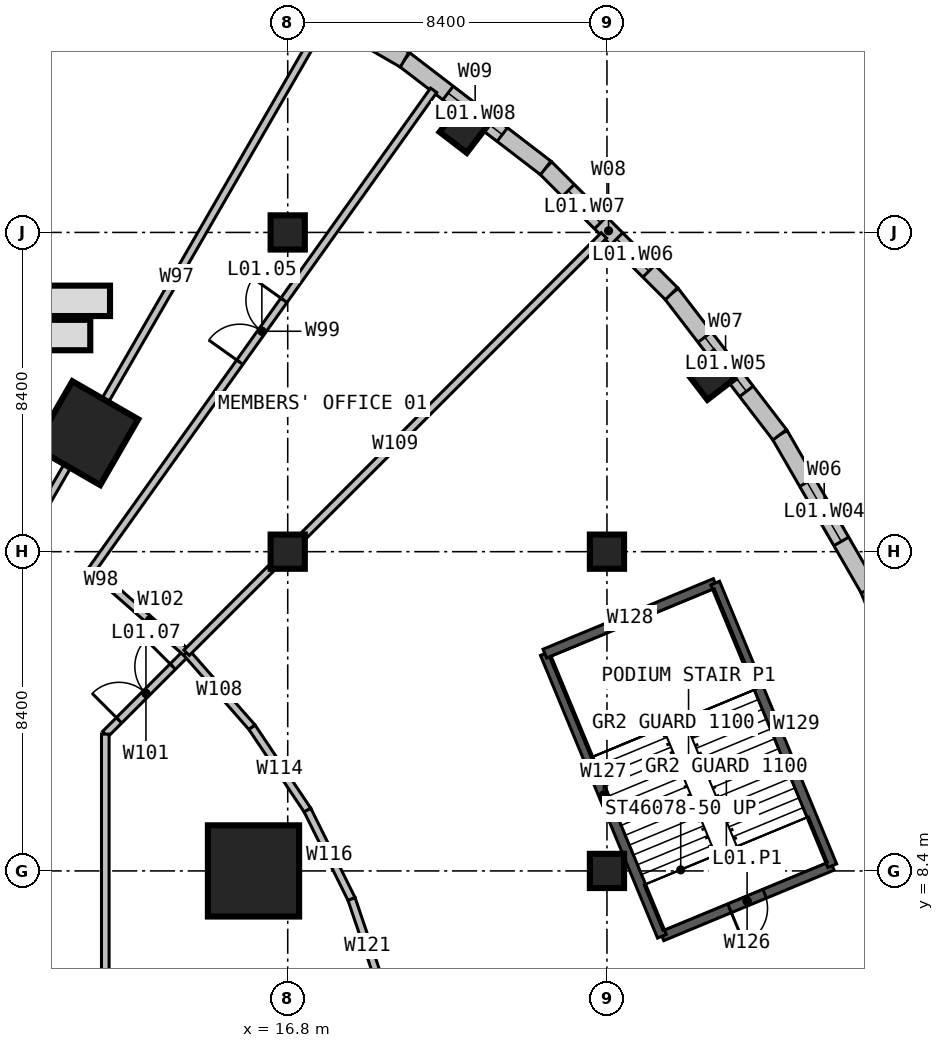
"""IFC4 building model, lengths in metres.
Left out: names, types, materials, properties, quantities, classifications, styles, units other than length and angle.
Written with IfcOpenShell. Run it as: python <this file> out.ifc"""

import sys

from ifc_helpers import new_model, si_unit, direction, frame, frame_2d, origin, origin_2d, place, context, subcontext, project, spatial, rectangle, hollow_rectangle, extrude, element, fill, save


model = new_model("IFC4")
c1 = context("Model", 3, precision=1e-05, world=origin(), true_north=direction((0.0, 1.0)))
c2 = subcontext(c1, "Body", "Model", "MODEL_VIEW")
j1 = project(units=[si_unit("LENGTHUNIT", "METRE"), si_unit("PLANEANGLEUNIT", "RADIAN")], contexts=[c1])
p1 = place(None, origin())
s1 = spatial("IfcSite", under=j1, at=p1, CompositionType="ELEMENT")
p2 = place(p1, origin())
s2 = spatial("IfcBuilding", under=s1, at=p2, CompositionType="ELEMENT")
p3 = place(p2, frame((0.0, 0.0, 6.0)))
s3 = spatial("IfcBuildingStorey", under=s2, at=p3, CompositionType="ELEMENT", Elevation=6.0)
p4 = place(p3, frame((15.9, 8.4, 0.0), z_axis=(0.0, 0.0, 1.0), x_axis=(1.0, 0.0, 0.0)))
e1 = element("IfcColumn", 1, at=p4, inside=s3, PredefinedType="COLUMN", context=c2, shape_type="SweptSolid", body=[
    extrude(rectangle(XDim=2.4, YDim=2.4, at=origin_2d()), origin(), (0.0, 0.0, 1.0), 5.0),
])
for number, where, z_axis, x_axis in (
    (2, (16.8, 16.8, 0.0), (0.0, 0.0, 1.0), (1.0, 0.0, 0.0)),
    (3, (16.8, 25.2, 0.0), (0.0, 0.0, 1.0), (1.0, 0.0, 0.0)),
    (4, (25.2, 8.4, 0.0), (0.0, 0.0, 1.0), (1.0, 0.0, 0.0)),
    (5, (25.2, 16.8, 0.0), (0.0, 0.0, 1.0), (1.0, 0.0, 0.0)),
    (6, (32.521, 13.47, 0.0), (0.0, 0.0, 1.0), (0.924, 0.383, 0.0)),
    (7, (27.926, 21.428, 0.0), (0.0, 0.0, 1.0), (0.793, 0.609, 0.0)),
    (8, (21.428, 27.926, 0.0), (0.0, 0.0, 1.0), (0.609, 0.793, 0.0)),
):
    element("IfcColumn", number, at=place(p3, frame(where, z_axis=z_axis, x_axis=x_axis)), inside=s3, PredefinedType="COLUMN", context=c2, shape_type="SweptSolid", body=[
        extrude(rectangle(XDim=0.9, YDim=0.9, at=origin_2d()), origin(), (0.0, 0.0, 1.0), 5.0),
    ])
p5 = place(p3, frame((11.5, 19.919, 0.0), z_axis=(0.0, 0.0, 1.0), x_axis=(0.5, 0.866025403784, 0.0)))
e9 = element("IfcColumn", 9, at=p5, inside=s3, PredefinedType="COLUMN", context=c2, shape_type="SweptSolid", body=[
    extrude(hollow_rectangle(XDim=2.0, YDim=2.0, WallThickness=0.24, at=origin_2d()), origin(), (0.0, 0.0, 1.0), 5.0),
])
p6 = place(p3, frame((33.876, 11.5, 0.0), z_axis=(0.0, 0.0, 1.0), x_axis=(-0.382669718086, 0.923885213032, 0.0)))
e10 = element("IfcWall", 10, at=p6, inside=s3, PredefinedType="SOLIDWALL", context=c2, shape_type="SweptSolid", body=[
    extrude(rectangle(XDim=4.68, YDim=0.45, at=frame_2d((2.34, 0.0))), origin(), (0.0, 0.0, 1.0), 4.7),
])
p7 = place(p6, frame((1.44, 0.0, 0.9)))
e11 = element("IfcOpeningElement", 11, at=p7, cuts=e10, PredefinedType="OPENING", context=c2, shape_type="SweptSolid", body=[
    extrude(rectangle(XDim=1.8, YDim=2.4, at=frame_2d((0.9, 1.2))), frame((0.0, 0.235, 0.0), z_axis=(0.0, -1.0, 0.0), x_axis=(1.0, 0.0, 0.0)), (0.0, 0.0, 1.0), 0.47),
])
p8 = place(p3, frame((32.086, 15.823, 0.0), z_axis=(0.0, 0.0, 1.0), x_axis=(-0.500022025083, 0.866012687223, 0.0)))
e12 = element("IfcWall", 12, at=p8, inside=s3, PredefinedType="SOLIDWALL", context=c2, shape_type="SweptSolid", body=[
    extrude(rectangle(XDim=4.679, YDim=0.45, at=frame_2d((2.34, 0.0))), origin(), (0.0, 0.0, 1.0), 4.7),
])
p9 = place(p8, frame((1.44, 0.0, 0.9)))
e13 = element("IfcOpeningElement", 13, at=p9, cuts=e12, PredefinedType="OPENING", context=c2, shape_type="SweptSolid", body=[
    extrude(rectangle(XDim=1.8, YDim=2.4, at=frame_2d((0.9, 1.2))), frame((0.0, 0.235, 0.0), z_axis=(0.0, -1.0, 0.0), x_axis=(1.0, 0.0, 0.0)), (0.0, 0.0, 1.0), 0.47),
])
p10 = place(p3, frame((29.746, 19.875, 0.0), z_axis=(0.0, 0.0, 1.0), x_axis=(-0.608769916927, 0.79334682721, 0.0)))
e14 = element("IfcWall", 14, at=p10, inside=s3, PredefinedType="SOLIDWALL", context=c2, shape_type="SweptSolid", body=[
    extrude(rectangle(XDim=4.68, YDim=0.45, at=frame_2d((2.34, 0.0))), origin(), (0.0, 0.0, 1.0), 4.7),
])
p11 = place(p10, frame((1.44, 0.0, 0.9)))
e15 = element("IfcOpeningElement", 15, at=p11, cuts=e14, PredefinedType="OPENING", context=c2, shape_type="SweptSolid", body=[
    extrude(rectangle(XDim=1.8, YDim=2.4, at=frame_2d((0.9, 1.2))), frame((0.0, 0.235, 0.0), z_axis=(0.0, -1.0, 0.0), x_axis=(1.0, 0.0, 0.0)), (0.0, 0.0, 1.0), 0.47),
])
p12 = place(p3, frame((26.897, 23.588, 0.0), z_axis=(0.0, 0.0, 1.0), x_axis=(-0.707106781187, 0.707106781187, 0.0)))
e16 = element("IfcWall", 16, at=p12, inside=s3, PredefinedType="SOLIDWALL", context=c2, shape_type="SweptSolid", body=[
    extrude(rectangle(XDim=4.679, YDim=0.45, at=frame_2d((2.34, 0.0))), origin(), (0.0, 0.0, 1.0), 4.7),
])
p13 = place(p12, frame((0.84, 0.0, 0.9)))
e17 = element("IfcOpeningElement", 17, at=p13, cuts=e16, PredefinedType="OPENING", context=c2, shape_type="SweptSolid", body=[
    extrude(rectangle(XDim=1.2, YDim=2.4, at=frame_2d((0.6, 1.2))), frame((0.0, 0.235, 0.0), z_axis=(0.0, -1.0, 0.0), x_axis=(1.0, 0.0, 0.0)), (0.0, 0.0, 1.0), 0.47),
])
p14 = place(p12, frame((2.64, 0.0, 0.9)))
e18 = element("IfcOpeningElement", 18, at=p14, cuts=e16, PredefinedType="OPENING", context=c2, shape_type="SweptSolid", body=[
    extrude(rectangle(XDim=1.2, YDim=2.4, at=frame_2d((0.6, 1.2))), frame((0.0, 0.235, 0.0), z_axis=(0.0, -1.0, 0.0), x_axis=(1.0, 0.0, 0.0)), (0.0, 0.0, 1.0), 0.47),
])
p15 = place(p3, frame((23.588, 26.897, 0.0), z_axis=(0.0, 0.0, 1.0), x_axis=(-0.79334682721, 0.608769916927, 0.0)))
e19 = element("IfcWall", 19, at=p15, inside=s3, PredefinedType="SOLIDWALL", context=c2, shape_type="SweptSolid", body=[
    extrude(rectangle(XDim=4.68, YDim=0.45, at=frame_2d((2.34, 0.0))), origin(), (0.0, 0.0, 1.0), 4.7),
])
p16 = place(p15, frame((1.44, 0.0, 0.9)))
e20 = element("IfcOpeningElement", 20, at=p16, cuts=e19, PredefinedType="OPENING", context=c2, shape_type="SweptSolid", body=[
    extrude(rectangle(XDim=1.8, YDim=2.4, at=frame_2d((0.9, 1.2))), frame((0.0, 0.235, 0.0), z_axis=(0.0, -1.0, 0.0), x_axis=(1.0, 0.0, 0.0)), (0.0, 0.0, 1.0), 0.47),
])
p17 = place(p3, frame((19.875, 29.746, 0.0), z_axis=(0.0, 0.0, 1.0), x_axis=(-0.866012687223, 0.500022025083, 0.0)))
e21 = element("IfcWall", 21, at=p17, inside=s3, PredefinedType="SOLIDWALL", context=c2, shape_type="SweptSolid", body=[
    extrude(rectangle(XDim=4.679, YDim=0.45, at=frame_2d((2.34, 0.0))), origin(), (0.0, 0.0, 1.0), 4.7),
])
p18 = place(p17, frame((0.84, 0.0, 0.9)))
e22 = element("IfcOpeningElement", 22, at=p18, cuts=e21, PredefinedType="OPENING", context=c2, shape_type="SweptSolid", body=[
    extrude(rectangle(XDim=1.2, YDim=2.4, at=frame_2d((0.6, 1.2))), frame((0.0, 0.235, 0.0), z_axis=(0.0, -1.0, 0.0), x_axis=(1.0, 0.0, 0.0)), (0.0, 0.0, 1.0), 0.47),
])
p19 = place(p17, frame((2.64, 0.0, 0.9)))
e23 = element("IfcOpeningElement", 23, at=p19, cuts=e21, PredefinedType="OPENING", context=c2, shape_type="SweptSolid", body=[
    extrude(rectangle(XDim=1.2, YDim=2.4, at=frame_2d((0.6, 1.2))), frame((0.0, 0.235, 0.0), z_axis=(0.0, -1.0, 0.0), x_axis=(1.0, 0.0, 0.0)), (0.0, 0.0, 1.0), 0.47),
])
p20 = place(p3, frame((31.127, 8.537, 0.0), z_axis=(0.0, 0.0, 1.0), x_axis=(-0.923880627248, -0.382680789426, 0.0)))
e24 = element("IfcWall", 24, at=p20, inside=s3, PredefinedType="SOLIDWALL", context=c2, shape_type="SweptSolid", body=[
    extrude(rectangle(XDim=4.85, YDim=0.25, at=frame_2d((2.425, 0.0))), origin(), (0.0, 0.0, 1.0), 5.0),
])
p21 = place(p20, frame((1.925, 0.0, 0.0)))
e25 = element("IfcOpeningElement", 25, at=p21, cuts=e24, PredefinedType="OPENING", context=c2, shape_type="SweptSolid", body=[
    extrude(rectangle(XDim=1.0, YDim=2.2, at=frame_2d((0.5, 1.1))), frame((0.0, 0.135, 0.0), z_axis=(0.0, -1.0, 0.0), x_axis=(1.0, 0.0, 0.0)), (0.0, 0.0, 1.0), 0.27),
])
p22 = place(p3, frame((26.647, 6.681, 0.0), z_axis=(0.0, 0.0, 1.0), x_axis=(-0.382689294869, 0.923877104161, 0.0)))
e26 = element("IfcWall", 26, at=p22, inside=s3, PredefinedType="SOLIDWALL", context=c2, shape_type="SweptSolid", body=[
    extrude(rectangle(XDim=8.05, YDim=0.25, at=frame_2d((4.025, 0.0))), origin(), (0.0, 0.0, 1.0), 5.0),
])
p23 = place(p3, frame((23.566, 14.118, 0.0), z_axis=(0.0, 0.0, 1.0), x_axis=(0.923862828997, 0.382723755727, 0.0)))
e27 = element("IfcWall", 27, at=p23, inside=s3, PredefinedType="SOLIDWALL", context=c2, shape_type="SweptSolid", body=[
    extrude(rectangle(XDim=4.85, YDim=0.25, at=frame_2d((2.425, 0.0))), origin(), (0.0, 0.0, 1.0), 5.0),
])
p24 = place(p3, frame((28.047, 15.974, 0.0), z_axis=(0.0, 0.0, 1.0), x_axis=(0.382678572144, -0.923881545666, 0.0)))
e28 = element("IfcWall", 28, at=p24, inside=s3, PredefinedType="SOLIDWALL", context=c2, shape_type="SweptSolid", body=[
    extrude(rectangle(XDim=8.05, YDim=0.25, at=frame_2d((4.025, 0.0))), origin(), (0.0, 0.0, 1.0), 5.0),
])
p25 = place(p3, frame((10.0, 17.32, 0.0), z_axis=(0.0, 0.0, 1.0), x_axis=(0.500022035744, 0.866012681068, 0.0)))
e29 = element("IfcWall", 29, at=p25, inside=s3, PredefinedType="PARTITIONING", context=c2, shape_type="SweptSolid", body=[
    extrude(rectangle(XDim=15.519, YDim=0.2, at=frame_2d((7.76, 0.0))), origin(), (0.0, 0.0, 1.0), 4.7),
])
p26 = place(p3, frame((11.6, 16.26, 0.0), z_axis=(0.0, 0.0, 1.0), x_axis=(0.823201613759, -0.567749155089, 0.0)))
e30 = element("IfcWall", 30, at=p26, inside=s3, PredefinedType="PARTITIONING", context=c2, shape_type="SweptSolid", body=[
    extrude(rectangle(XDim=0.704, YDim=0.2, at=frame_2d((0.352, 0.0))), origin(), (0.0, 0.0, 1.0), 4.7),
])
p27 = place(p3, frame((11.6, 16.26, 0.0), z_axis=(0.0, 0.0, 1.0), x_axis=(0.580502370217, 0.814258557322, 0.0)))
e31 = element("IfcWall", 31, at=p27, inside=s3, PredefinedType="PARTITIONING", context=c2, shape_type="SweptSolid", body=[
    extrude(rectangle(XDim=15.572, YDim=0.2, at=frame_2d((7.786, 0.0))), origin(), (0.0, 0.0, 1.0), 4.7),
])
p28 = place(p27, frame((6.786, 0.0, 0.0)))
e32 = element("IfcOpeningElement", 32, at=p28, cuts=e31, PredefinedType="OPENING", context=c2, shape_type="SweptSolid", body=[
    extrude(rectangle(XDim=2.0, YDim=2.4, at=frame_2d((1.0, 1.2))), frame((0.0, 0.11, 0.0), z_axis=(0.0, -1.0, 0.0), x_axis=(1.0, 0.0, 0.0)), (0.0, 0.0, 1.0), 0.22),
])
p29 = place(p3, frame((12.0, 12.0, 0.0), z_axis=(0.0, 0.0, 1.0), x_axis=(0.707106781187, 0.707106781187, 0.0)))
e33 = element("IfcWall", 33, at=p29, inside=s3, PredefinedType="PARTITIONING", context=c2, shape_type="SweptSolid", body=[
    extrude(rectangle(XDim=3.026, YDim=0.2, at=frame_2d((1.513, 0.0))), origin(), (0.0, 0.0, 1.0), 4.7),
])
p30 = place(p29, frame((0.513, 0.0, 0.0)))
e34 = element("IfcOpeningElement", 34, at=p30, cuts=e33, PredefinedType="OPENING", context=c2, shape_type="SweptSolid", body=[
    extrude(rectangle(XDim=2.0, YDim=2.4, at=frame_2d((1.0, 1.2))), frame((0.0, 0.11, 0.0), z_axis=(0.0, -1.0, 0.0), x_axis=(1.0, 0.0, 0.0)), (0.0, 0.0, 1.0), 0.22),
])
for number, where, z_axis, x_axis in (
    (35, (12.18, 15.86, 0.0), (0.0, 0.0, 1.0), (0.752, -0.66, 0.0)),
    (36, (14.14, 14.14, 0.0), (0.0, 0.0, 1.0), (0.66, -0.752, 0.0)),
):
    element("IfcWall", number, at=place(p3, frame(where, z_axis=z_axis, x_axis=x_axis)), inside=s3, PredefinedType="PARTITIONING", context=c2, shape_type="SweptSolid", body=[
        extrude(rectangle(XDim=2.608, YDim=0.2, at=frame_2d((1.304, 0.0))), origin(), (0.0, 0.0, 1.0), 4.7),
    ])
p31 = place(p3, frame((14.14, 14.14, 0.0), z_axis=(0.0, 0.0, 1.0), x_axis=(0.707106781187, 0.707106781187, 0.0)))
e37 = element("IfcWall", 37, at=p31, inside=s3, PredefinedType="PARTITIONING", context=c2, shape_type="SweptSolid", body=[
    extrude(rectangle(XDim=15.528, YDim=0.2, at=frame_2d((7.764, 0.0))), origin(), (0.0, 0.0, 1.0), 4.7),
])
p32 = place(p3, frame((15.86, 12.18, 0.0), z_axis=(0.0, 0.0, 1.0), x_axis=(0.556459812229, -0.83087452565, 0.0)))
e38 = element("IfcWall", 38, at=p32, inside=s3, PredefinedType="PARTITIONING", context=c2, shape_type="SweptSolid", body=[
    extrude(rectangle(XDim=2.624, YDim=0.2, at=frame_2d((1.312, 0.0))), origin(), (0.0, 0.0, 1.0), 4.7),
])
p33 = place(p3, frame((17.32, 10.0, 0.0), z_axis=(0.0, 0.0, 1.0), x_axis=(0.444107479291, -0.895973519049, 0.0)))
e39 = element("IfcWall", 39, at=p33, inside=s3, PredefinedType="PARTITIONING", context=c2, shape_type="SweptSolid", body=[
    extrude(rectangle(XDim=2.612, YDim=0.2, at=frame_2d((1.306, 0.0))), origin(), (0.0, 0.0, 1.0), 4.7),
])
p34 = place(p3, frame((18.48, 7.66, 0.0), z_axis=(0.0, 0.0, 1.0), x_axis=(0.320839411875, -0.947133608203, 0.0)))
e40 = element("IfcWall", 40, at=p34, inside=s3, PredefinedType="PARTITIONING", context=c2, shape_type="SweptSolid", body=[
    extrude(rectangle(XDim=2.618, YDim=0.2, at=frame_2d((1.309, 0.0))), origin(), (0.0, 0.0, 1.0), 4.7),
])
p35 = place(p3, frame((12.0, -12.0, 0.0), z_axis=(0.0, 0.0, 1.0), x_axis=(0.0, 1.0, 0.0)))
e41 = element("IfcWall", 41, at=p35, inside=s3, PredefinedType="PARTITIONING", context=c2, shape_type="SweptSolid", body=[
    extrude(rectangle(XDim=24.0, YDim=0.2, at=frame_2d((12.0, 0.0))), origin(), (0.0, 0.0, 1.0), 4.7),
])
p36 = place(p9, origin())
e42 = element("IfcWindow", 42, at=p36, inside=s3, PartitioningType="SINGLE_PANEL", PredefinedType="WINDOW", context=c2, shape_type="SweptSolid", body=[
    extrude(rectangle(XDim=1.8, YDim=2.4, at=frame_2d((0.9, 1.2))), frame((0.0, 0.03, 0.0), z_axis=(0.0, -1.0, 0.0), x_axis=(1.0, 0.0, 0.0)), (0.0, 0.0, 1.0), 0.06),
])
fill(e13, e42)
p37 = place(p11, origin())
e43 = element("IfcWindow", 43, at=p37, inside=s3, PartitioningType="SINGLE_PANEL", PredefinedType="WINDOW", context=c2, shape_type="SweptSolid", body=[
    extrude(rectangle(XDim=1.8, YDim=2.4, at=frame_2d((0.9, 1.2))), frame((0.0, 0.03, 0.0), z_axis=(0.0, -1.0, 0.0), x_axis=(1.0, 0.0, 0.0)), (0.0, 0.0, 1.0), 0.06),
])
fill(e15, e43)
p38 = place(p13, origin())
e44 = element("IfcWindow", 44, at=p38, inside=s3, PartitioningType="SINGLE_PANEL", PredefinedType="WINDOW", context=c2, shape_type="SweptSolid", body=[
    extrude(rectangle(XDim=1.2, YDim=2.4, at=frame_2d((0.6, 1.2))), frame((0.0, 0.03, 0.0), z_axis=(0.0, -1.0, 0.0), x_axis=(1.0, 0.0, 0.0)), (0.0, 0.0, 1.0), 0.06),
])
fill(e17, e44)
p39 = place(p14, origin())
e45 = element("IfcWindow", 45, at=p39, inside=s3, PartitioningType="SINGLE_PANEL", PredefinedType="WINDOW", context=c2, shape_type="SweptSolid", body=[
    extrude(rectangle(XDim=1.2, YDim=2.4, at=frame_2d((0.6, 1.2))), frame((0.0, 0.03, 0.0), z_axis=(0.0, -1.0, 0.0), x_axis=(1.0, 0.0, 0.0)), (0.0, 0.0, 1.0), 0.06),
])
fill(e18, e45)
p40 = place(p16, origin())
e46 = element("IfcWindow", 46, at=p40, inside=s3, PartitioningType="SINGLE_PANEL", PredefinedType="WINDOW", context=c2, shape_type="SweptSolid", body=[
    extrude(rectangle(XDim=1.8, YDim=2.4, at=frame_2d((0.9, 1.2))), frame((0.0, 0.03, 0.0), z_axis=(0.0, -1.0, 0.0), x_axis=(1.0, 0.0, 0.0)), (0.0, 0.0, 1.0), 0.06),
])
fill(e20, e46)
p41 = place(p21, origin())
e47 = element("IfcDoor", 47, at=p41, inside=s3, OperationType="SINGLE_SWING_RIGHT", PredefinedType="DOOR", context=c2, shape_type="SweptSolid", body=[
    extrude(rectangle(XDim=1.0, YDim=2.2, at=frame_2d((0.5, 1.1))), frame((0.0, 0.025, 0.0), z_axis=(0.0, -1.0, 0.0), x_axis=(1.0, 0.0, 0.0)), (0.0, 0.0, 1.0), 0.05),
])
fill(e25, e47)
p42 = place(p28, origin())
e48 = element("IfcDoor", 48, at=p42, inside=s3, OperationType="DOUBLE_DOOR_SINGLE_SWING", PredefinedType="DOOR", context=c2, shape_type="SweptSolid", body=[
    extrude(rectangle(XDim=2.0, YDim=2.4, at=frame_2d((1.0, 1.2))), frame((0.0, 0.025, 0.0), z_axis=(0.0, -1.0, 0.0), x_axis=(1.0, 0.0, 0.0)), (0.0, 0.0, 1.0), 0.05),
])
fill(e32, e48)
p43 = place(p30, origin())
e49 = element("IfcDoor", 49, at=p43, inside=s3, OperationType="DOUBLE_DOOR_SINGLE_SWING", PredefinedType="DOOR", context=c2, shape_type="SweptSolid", body=[
    extrude(rectangle(XDim=2.0, YDim=2.4, at=frame_2d((1.0, 1.2))), frame((0.0, 0.025, 0.0), z_axis=(0.0, -1.0, 0.0), x_axis=(1.0, 0.0, 0.0)), (0.0, 0.0, 1.0), 0.05),
])
fill(e34, e49)
save(model, sys.argv[1])
